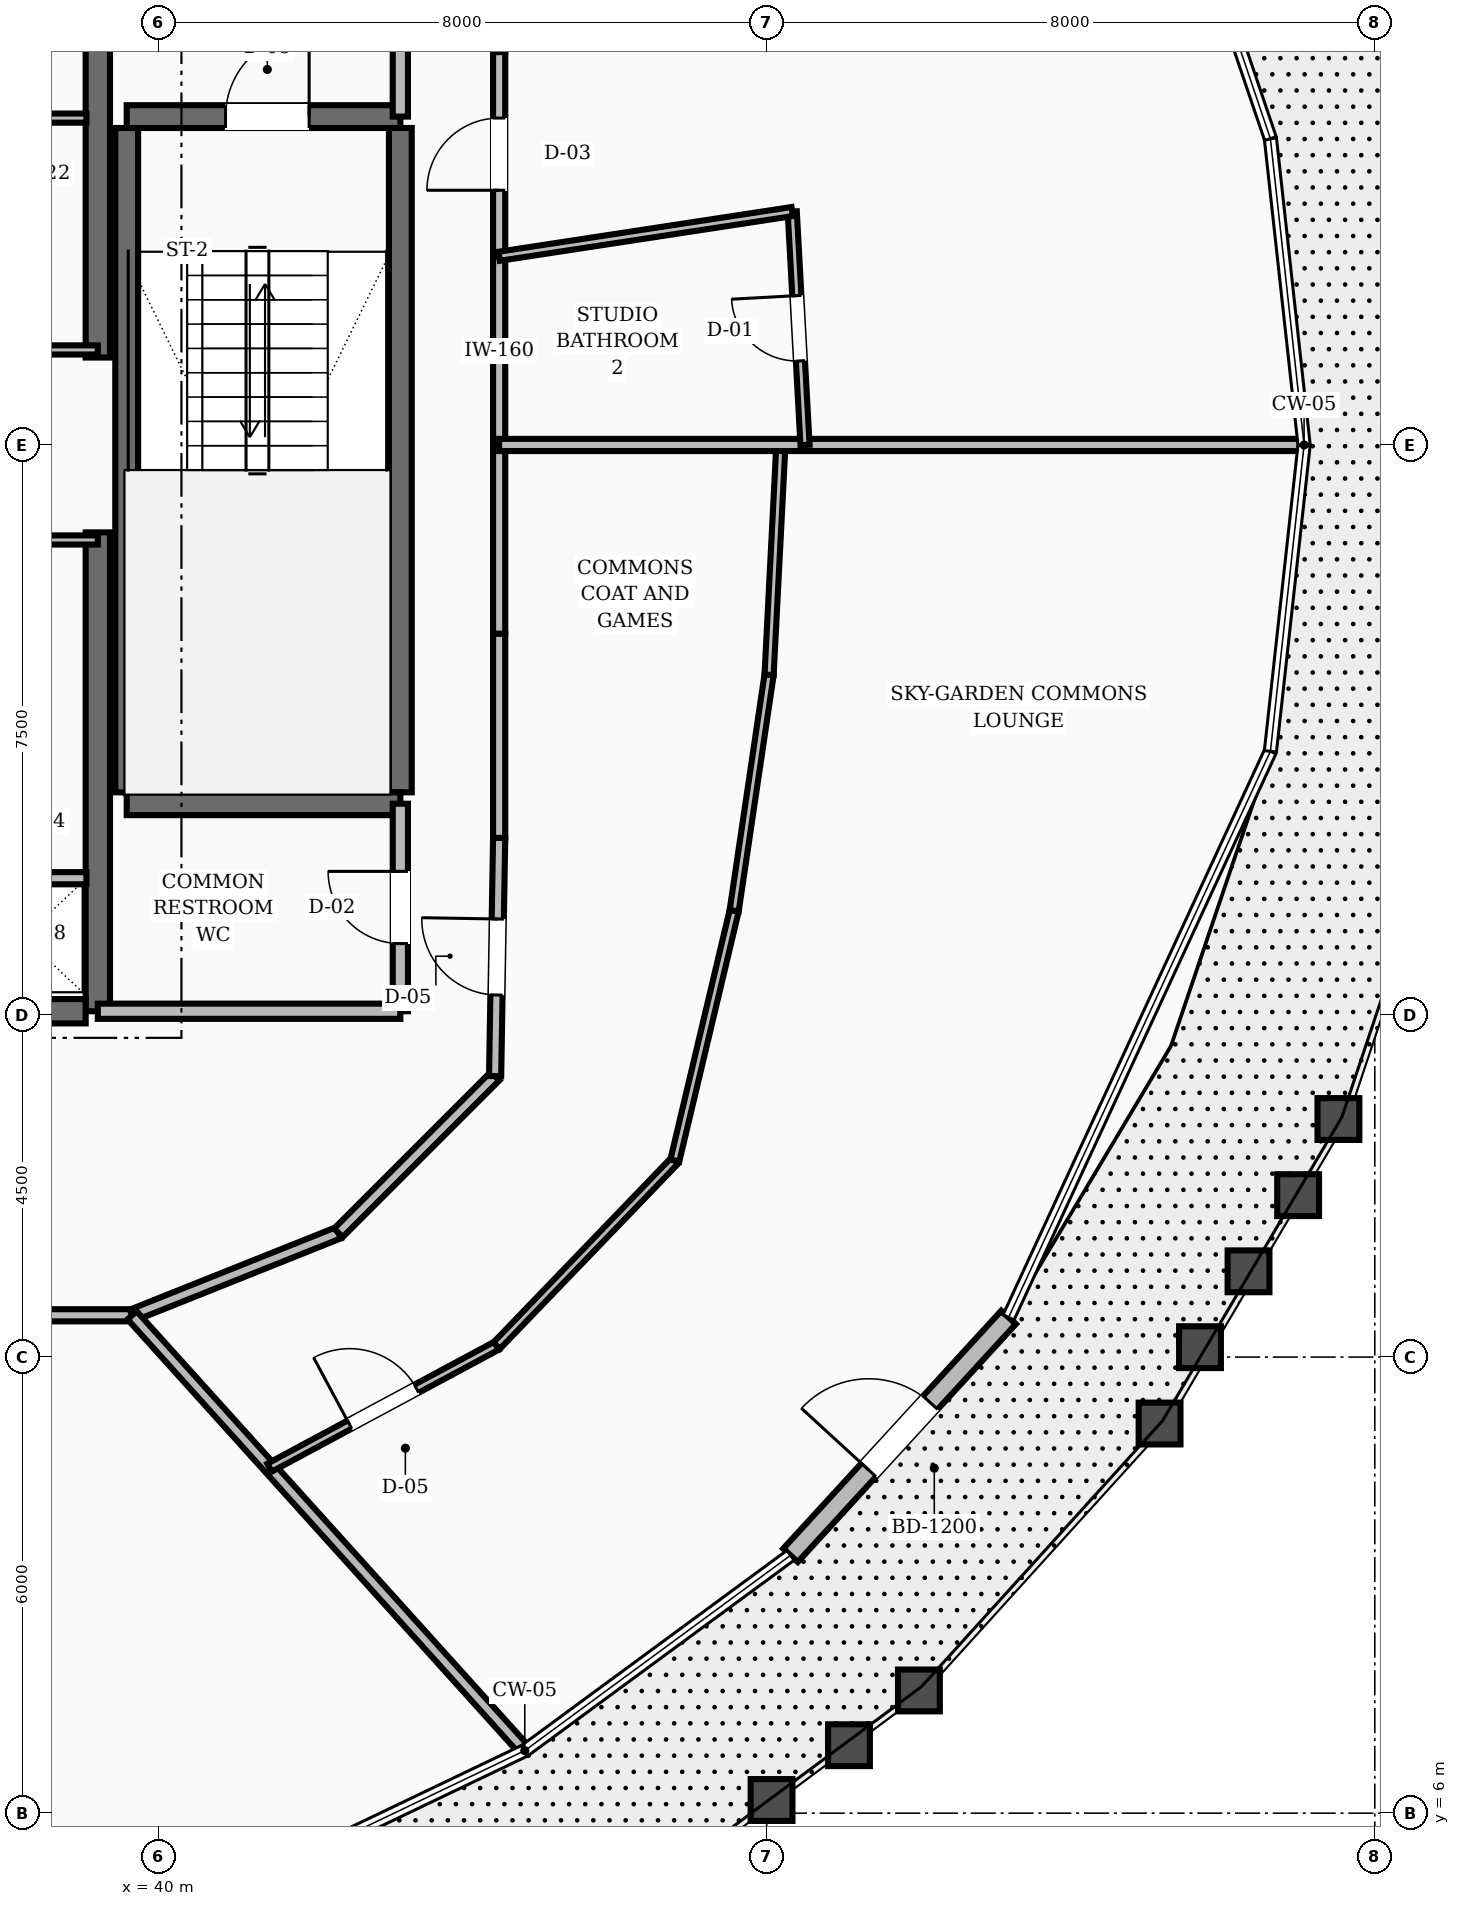
"""IFC4 building model, lengths in metres.
Left out: names, types, materials, properties, quantities, classifications, styles, units other than length and angle.
Written with IfcOpenShell. Run it as: python <this file> out.ifc"""

import sys

from ifc_helpers import new_model, si_unit, direction, frame, frame_2d, origin, place, context, subcontext, project, spatial, rectangle, extrude, element, fill, save


model = new_model("IFC4")
c1 = context("Model", 3, precision=1e-05, world=origin(), true_north=direction((0.0, 1.0)))
c2 = subcontext(c1, "Body", "Model", "MODEL_VIEW")
j1 = project(units=[si_unit("LENGTHUNIT", "METRE"), si_unit("PLANEANGLEUNIT", "RADIAN")], contexts=[c1])
p1 = place(None, origin())
s1 = spatial("IfcSite", under=j1, at=p1, CompositionType="ELEMENT")
p2 = place(p1, origin())
s2 = spatial("IfcBuilding", under=s1, at=p2, CompositionType="ELEMENT")
p3 = place(p2, frame((0.0, 0.0, 214.8)))
s3 = spatial("IfcBuildingStorey", under=s2, at=p3, CompositionType="ELEMENT", Elevation=214.8)
for number, where, z_axis, x_axis in (
    (1, (39.2, 16.55, 0.0), (0.0, 0.0, 1.0), (0.0, 1.0, 0.0)),
    (2, (39.2, 25.15, 0.0), (0.0, 0.0, 1.0), (0.0, 1.0, 0.0)),
):
    element("IfcWall", number, at=place(p3, frame(where, z_axis=z_axis, x_axis=x_axis)), inside=s3, PredefinedType="SHEAR", context=c2, shape_type="SweptSolid", body=[
        extrude(rectangle(XDim=6.3, YDim=0.32, at=frame_2d((3.15, 0.0))), origin(), (0.0, 0.0, 1.0), 3.6),
    ])
p4 = place(p3, frame((35.8, 16.55, 0.0), z_axis=(0.0, 0.0, 1.0), x_axis=(1.0, 0.0, 0.0)))
e3 = element("IfcWall", 3, at=p4, inside=s3, PredefinedType="SHEAR", context=c2, shape_type="SweptSolid", body=[
    extrude(rectangle(XDim=3.24, YDim=0.32, at=frame_2d((1.62, 0.0))), origin(), (0.0, 0.0, 1.0), 3.6),
])
p5 = place(p4, frame((0.3, 0.0, 0.0)))
e4 = element("IfcOpeningElement", 4, at=p5, cuts=e3, PredefinedType="OPENING", context=c2, shape_type="SweptSolid", body=[
    extrude(rectangle(XDim=1.1, YDim=2.1, at=frame_2d((0.55, 1.05))), frame((0.0, 0.17, 0.0), z_axis=(0.0, -1.0, 0.0), x_axis=(1.0, 0.0, 0.0)), (0.0, 0.0, 1.0), 0.34),
])
for number, where, z_axis, x_axis in (
    (5, (43.18, 19.43, 0.0), (0.0, 0.0, 1.0), (0.0, 1.0, 0.0)),
    (6, (39.58, 19.43, 0.0), (0.0, 0.0, 1.0), (0.0, 1.0, 0.0)),
):
    element("IfcWall", number, at=place(p3, frame(where, z_axis=z_axis, x_axis=x_axis)), inside=s3, PredefinedType="SHEAR", context=c2, shape_type="SweptSolid", body=[
        extrude(rectangle(XDim=8.74, YDim=0.3, at=frame_2d((4.37, 0.0))), origin(), (0.0, 0.0, 1.0), 3.6),
    ])
p6 = place(p3, frame((39.58, 19.28, 0.0), z_axis=(0.0, 0.0, 1.0), x_axis=(1.0, 0.0, 0.0)))
e7 = element("IfcWall", 7, at=p6, inside=s3, PredefinedType="SHEAR", context=c2, shape_type="SweptSolid", body=[
    extrude(rectangle(XDim=3.6, YDim=0.3, at=frame_2d((1.8, 0.0))), origin(), (0.0, 0.0, 1.0), 3.6),
])
p7 = place(p3, frame((39.58, 28.32, 0.0), z_axis=(0.0, 0.0, 1.0), x_axis=(1.0, 0.0, 0.0)))
e8 = element("IfcWall", 8, at=p7, inside=s3, PredefinedType="SHEAR", context=c2, shape_type="SweptSolid", body=[
    extrude(rectangle(XDim=3.6, YDim=0.3, at=frame_2d((1.8, 0.0))), origin(), (0.0, 0.0, 1.0), 3.6),
])
p8 = place(p7, frame((1.3, 0.0, 0.0)))
e9 = element("IfcOpeningElement", 9, at=p8, cuts=e8, PredefinedType="OPENING", context=c2, shape_type="SweptSolid", body=[
    extrude(rectangle(XDim=1.1, YDim=2.1, at=frame_2d((0.55, 1.05))), frame((0.0, 0.16, 0.0), z_axis=(0.0, -1.0, 0.0), x_axis=(1.0, 0.0, 0.0)), (0.0, 0.0, 1.0), 0.32),
])
p9 = place(p3, frame((48.313, 9.392, 0.0), z_axis=(0.0, 0.0, 1.0), x_axis=(0.675617876926, 0.737251981603, 0.0)))
e10 = element("IfcWall", 10, at=p9, inside=s3, PredefinedType="STANDARD", context=c2, shape_type="SweptSolid", body=[
    extrude(rectangle(XDim=4.246, YDim=0.26, at=frame_2d((2.123, 0.0))), origin(), (0.0, 0.0, 1.0), 2.88),
])
p10 = place(p9, frame((1.523, 0.0, 0.0)))
e11 = element("IfcOpeningElement", 11, at=p10, cuts=e10, PredefinedType="OPENING", context=c2, shape_type="SweptSolid", body=[
    extrude(rectangle(XDim=1.2, YDim=2.15, at=frame_2d((0.6, 1.075))), frame((0.0, 0.14, 0.0), z_axis=(0.0, -1.0, 0.0), x_axis=(1.0, 0.0, 0.0)), (0.0, 0.0, 1.0), 0.28),
])
p11 = place(p3, frame((43.18, 28.32, 0.0), z_axis=(0.0, 0.0, 1.0), x_axis=(0.0, 1.0, 0.0)))
e12 = element("IfcWall", 12, at=p11, inside=s3, PredefinedType="SOLIDWALL", context=c2, shape_type="SweptSolid", body=[
    extrude(rectangle(XDim=3.13, YDim=0.2, at=frame_2d((1.565, 0.0))), origin(), (0.0, 0.0, 1.0), 2.87),
])
p12 = place(p11, frame((1.015, 0.0, 0.0)))
e13 = element("IfcOpeningElement", 13, at=p12, cuts=e12, PredefinedType="OPENING", context=c2, shape_type="SweptSolid", body=[
    extrude(rectangle(XDim=1.1, YDim=2.1, at=frame_2d((0.55, 1.05))), frame((0.0, 0.11, 0.0), z_axis=(0.0, -1.0, 0.0), x_axis=(1.0, 0.0, 0.0)), (0.0, 0.0, 1.0), 0.22),
])
p13 = place(p3, frame((43.18, 16.55, 0.0), z_axis=(0.0, 0.0, 1.0), x_axis=(0.0, 1.0, 0.0)))
e14 = element("IfcWall", 14, at=p13, inside=s3, PredefinedType="SOLIDWALL", context=c2, shape_type="SweptSolid", body=[
    extrude(rectangle(XDim=2.73, YDim=0.2, at=frame_2d((1.365, 0.0))), origin(), (0.0, 0.0, 1.0), 2.87),
])
p14 = place(p13, frame((0.89, 0.0, 0.0)))
e15 = element("IfcOpeningElement", 15, at=p14, cuts=e14, PredefinedType="OPENING", context=c2, shape_type="SweptSolid", body=[
    extrude(rectangle(XDim=0.95, YDim=2.1, at=frame_2d((0.475, 1.05))), frame((0.0, 0.11, 0.0), z_axis=(0.0, -1.0, 0.0), x_axis=(1.0, 0.0, 0.0)), (0.0, 0.0, 1.0), 0.22),
])
p15 = place(p3, frame((39.2, 16.55, 0.0), z_axis=(0.0, 0.0, 1.0), x_axis=(1.0, 0.0, 0.0)))
e16 = element("IfcWall", 16, at=p15, inside=s3, PredefinedType="SOLIDWALL", context=c2, shape_type="SweptSolid", body=[
    extrude(rectangle(XDim=3.98, YDim=0.2, at=frame_2d((1.99, 0.0))), origin(), (0.0, 0.0, 1.0), 2.87),
])
p16 = place(p3, frame((37.4, 18.3, 0.0), z_axis=(0.0, 0.0, 1.0), x_axis=(1.0, 0.0, 0.0)))
e17 = element("IfcWall", 17, at=p16, inside=s3, PredefinedType="SOLIDWALL", context=c2, shape_type="SweptSolid", body=[
    extrude(rectangle(XDim=1.65, YDim=0.16, at=frame_2d((0.825, 0.0))), origin(), (0.0, 0.0, 1.0), 2.87),
])
for number, where, z_axis, x_axis in (
    (18, (37.4, 25.25, 0.0), (0.0, 0.0, 1.0), (1.0, 0.0, 0.0)),
    (19, (37.4, 22.75, 0.0), (0.0, 0.0, 1.0), (1.0, 0.0, 0.0)),
):
    element("IfcWall", number, at=place(p3, frame(where, z_axis=z_axis, x_axis=x_axis)), inside=s3, PredefinedType="PARTITIONING", context=c2, shape_type="SweptSolid", body=[
        extrude(rectangle(XDim=1.8, YDim=0.12, at=frame_2d((0.9, 0.0))), origin(), (0.0, 0.0, 1.0), 2.87),
    ])
p17 = place(p3, frame((37.4, 28.3, 0.0), z_axis=(0.0, 0.0, 1.0), x_axis=(1.0, 0.0, 0.0)))
e20 = element("IfcWall", 20, at=p17, inside=s3, PredefinedType="PARTITIONING", context=c2, shape_type="SweptSolid", body=[
    extrude(rectangle(XDim=1.65, YDim=0.12, at=frame_2d((0.825, 0.0))), origin(), (0.0, 0.0, 1.0), 2.87),
])
p18 = place(p3, frame((44.48, 24.0, 0.0), z_axis=(0.0, 0.0, 1.0), x_axis=(0.0, 1.0, 0.0)))
e21 = element("IfcWall", 21, at=p18, inside=s3, PredefinedType="SOLIDWALL", context=c2, shape_type="SweptSolid", body=[
    extrude(rectangle(XDim=2.482, YDim=0.16, at=frame_2d((1.241, 0.0))), origin(), (0.0, 0.0, 1.0), 2.87),
])
p19 = place(p3, frame((44.48, 26.482, 0.0), z_axis=(0.0, 0.0, 1.0), x_axis=(0.0, 1.0, 0.0)))
e22 = element("IfcWall", 22, at=p19, inside=s3, PredefinedType="SOLIDWALL", context=c2, shape_type="SweptSolid", body=[
    extrude(rectangle(XDim=2.687, YDim=0.16, at=frame_2d((1.344, 0.0))), origin(), (0.0, 0.0, 1.0), 2.87),
])
p20 = place(p19, frame((0.868, 0.0, 0.0)))
e23 = element("IfcOpeningElement", 23, at=p20, cuts=e22, PredefinedType="OPENING", context=c2, shape_type="SweptSolid", body=[
    extrude(rectangle(XDim=0.95, YDim=2.1, at=frame_2d((0.475, 1.05))), frame((0.0, 0.09, 0.0), z_axis=(0.0, -1.0, 0.0), x_axis=(1.0, 0.0, 0.0)), (0.0, 0.0, 1.0), 0.18),
])
p21 = place(p3, frame((44.48, 29.169, 0.0), z_axis=(0.0, 0.0, 1.0), x_axis=(-0.016981035134, 0.999855811828, 0.0)))
e24 = element("IfcWall", 24, at=p21, inside=s3, PredefinedType="SOLIDWALL", context=c2, shape_type="SweptSolid", body=[
    extrude(rectangle(XDim=3.134, YDim=0.16, at=frame_2d((1.567, 0.0))), origin(), (0.0, 0.0, 1.0), 2.87),
])
p22 = place(p3, frame((36.743, 12.55, 0.0), z_axis=(0.0, 0.0, 1.0), x_axis=(1.0, 0.0, 0.0)))
e25 = element("IfcWall", 25, at=p22, inside=s3, PredefinedType="SOLIDWALL", context=c2, shape_type="SweptSolid", body=[
    extrude(rectangle(XDim=2.908, YDim=0.16, at=frame_2d((1.454, 0.0))), origin(), (0.0, 0.0, 1.0), 2.87),
])
p23 = place(p3, frame((39.651, 12.55, 0.0), z_axis=(0.0, 0.0, 1.0), x_axis=(0.92856882165, 0.371160266542, 0.0)))
e26 = element("IfcWall", 26, at=p23, inside=s3, PredefinedType="SOLIDWALL", context=c2, shape_type="SweptSolid", body=[
    extrude(rectangle(XDim=2.923, YDim=0.16, at=frame_2d((1.461, 0.0))), origin(), (0.0, 0.0, 1.0), 2.87),
])
p24 = place(p3, frame((42.365, 13.635, 0.0), z_axis=(0.0, 0.0, 1.0), x_axis=(0.707106781187, 0.707106781187, 0.0)))
e27 = element("IfcWall", 27, at=p24, inside=s3, PredefinedType="SOLIDWALL", context=c2, shape_type="SweptSolid", body=[
    extrude(rectangle(XDim=2.916, YDim=0.16, at=frame_2d((1.458, 0.0))), origin(), (0.0, 0.0, 1.0), 2.87),
])
p25 = place(p3, frame((44.427, 15.697, 0.0), z_axis=(0.0, 0.0, 1.0), x_axis=(0.016981035134, 0.999855811828, 0.0)))
e28 = element("IfcWall", 28, at=p25, inside=s3, PredefinedType="SOLIDWALL", context=c2, shape_type="SweptSolid", body=[
    extrude(rectangle(XDim=3.134, YDim=0.16, at=frame_2d((1.567, 0.0))), origin(), (0.0, 0.0, 1.0), 2.87),
])
p26 = place(p25, frame((1.067, 0.0, 0.0)))
e29 = element("IfcOpeningElement", 29, at=p26, cuts=e28, PredefinedType="OPENING", context=c2, shape_type="SweptSolid", body=[
    extrude(rectangle(XDim=1.0, YDim=2.1, at=frame_2d((0.5, 1.05))), frame((0.0, 0.09, 0.0), z_axis=(0.0, -1.0, 0.0), x_axis=(1.0, 0.0, 0.0)), (0.0, 0.0, 1.0), 0.18),
])
p27 = place(p3, frame((44.48, 18.831, 0.0), z_axis=(0.0, 0.0, 1.0), x_axis=(0.0, 1.0, 0.0)))
e30 = element("IfcWall", 30, at=p27, inside=s3, PredefinedType="SOLIDWALL", context=c2, shape_type="SweptSolid", body=[
    extrude(rectangle(XDim=2.687, YDim=0.16, at=frame_2d((1.344, 0.0))), origin(), (0.0, 0.0, 1.0), 2.87),
])
p28 = place(p3, frame((44.48, 21.518, 0.0), z_axis=(0.0, 0.0, 1.0), x_axis=(0.0, 1.0, 0.0)))
e31 = element("IfcWall", 31, at=p28, inside=s3, PredefinedType="SOLIDWALL", context=c2, shape_type="SweptSolid", body=[
    extrude(rectangle(XDim=2.482, YDim=0.16, at=frame_2d((1.241, 0.0))), origin(), (0.0, 0.0, 1.0), 2.87),
])
p29 = place(p3, frame((39.651, 12.55, 0.0), z_axis=(0.0, 0.0, 1.0), x_axis=(0.669803904272, -0.742538032576, 0.0)))
e32 = element("IfcWall", 32, at=p29, inside=s3, PredefinedType="SOLIDWALL", context=c2, shape_type="SweptSolid", body=[
    extrude(rectangle(XDim=7.663, YDim=0.16, at=frame_2d((3.832, 0.0))), origin(), (0.0, 0.0, 1.0), 2.87),
])
p30 = place(p3, frame((41.459, 10.545, 0.0), z_axis=(0.0, 0.0, 1.0), x_axis=(0.881018320822, 0.473082147597, 0.0)))
e33 = element("IfcWall", 33, at=p30, inside=s3, PredefinedType="PARTITIONING", context=c2, shape_type="SweptSolid", body=[
    extrude(rectangle(XDim=3.392, YDim=0.12, at=frame_2d((1.696, 0.0))), origin(), (0.0, 0.0, 1.0), 2.87),
])
p31 = place(p30, frame((1.196, 0.0, 0.0)))
e34 = element("IfcOpeningElement", 34, at=p31, cuts=e33, PredefinedType="OPENING", context=c2, shape_type="SweptSolid", body=[
    extrude(rectangle(XDim=1.0, YDim=2.1, at=frame_2d((0.5, 1.05))), frame((0.0, 0.07, 0.0), z_axis=(0.0, -1.0, 0.0), x_axis=(1.0, 0.0, 0.0)), (0.0, 0.0, 1.0), 0.14),
])
p32 = place(p3, frame((44.447, 12.15, 0.0), z_axis=(0.0, 0.0, 1.0), x_axis=(0.693436261911, 0.720517973868, 0.0)))
e35 = element("IfcWall", 35, at=p32, inside=s3, PredefinedType="PARTITIONING", context=c2, shape_type="SweptSolid", body=[
    extrude(rectangle(XDim=3.381, YDim=0.12, at=frame_2d((1.69, 0.0))), origin(), (0.0, 0.0, 1.0), 2.87),
])
p33 = place(p3, frame((46.791, 14.586, 0.0), z_axis=(0.0, 0.0, 1.0), x_axis=(0.231161352682, 0.972915427479, 0.0)))
e36 = element("IfcWall", 36, at=p33, inside=s3, PredefinedType="PARTITIONING", context=c2, shape_type="SweptSolid", body=[
    extrude(rectangle(XDim=3.379, YDim=0.12, at=frame_2d((1.689, 0.0))), origin(), (0.0, 0.0, 1.0), 2.87),
])
p34 = place(p3, frame((47.572, 17.873, 0.0), z_axis=(0.0, 0.0, 1.0), x_axis=(0.146399162182, 0.989225598796, 0.0)))
e37 = element("IfcWall", 37, at=p34, inside=s3, PredefinedType="PARTITIONING", context=c2, shape_type="SweptSolid", body=[
    extrude(rectangle(XDim=3.137, YDim=0.12, at=frame_2d((1.568, 0.0))), origin(), (0.0, 0.0, 1.0), 2.87),
])
p35 = place(p3, frame((48.031, 20.976, 0.0), z_axis=(0.0, 0.0, 1.0), x_axis=(0.051276607355, 0.998684489485, 0.0)))
e38 = element("IfcWall", 38, at=p35, inside=s3, PredefinedType="PARTITIONING", context=c2, shape_type="SweptSolid", body=[
    extrude(rectangle(XDim=3.028, YDim=0.12, at=frame_2d((1.514, 0.0))), origin(), (0.0, 0.0, 1.0), 2.87),
])
p36 = place(p3, frame((44.48, 24.0, 0.0), z_axis=(0.0, 0.0, 1.0), x_axis=(1.0, 0.0, 0.0)))
e39 = element("IfcWall", 39, at=p36, inside=s3, PredefinedType="SOLIDWALL", context=c2, shape_type="SweptSolid", body=[
    extrude(rectangle(XDim=10.54, YDim=0.16, at=frame_2d((5.27, 0.0))), origin(), (0.0, 0.0, 1.0), 2.87),
])
p37 = place(p3, frame((48.504, 24.0, 0.0), z_axis=(0.0, 0.0, 1.0), x_axis=(-0.054779672564, 0.998498466435, 0.0)))
e40 = element("IfcWall", 40, at=p37, inside=s3, PredefinedType="PARTITIONING", context=c2, shape_type="SweptSolid", body=[
    extrude(rectangle(XDim=3.075, YDim=0.12, at=frame_2d((1.538, 0.0))), origin(), (0.0, 0.0, 1.0), 2.87),
])
p38 = place(p37, frame((1.108, 0.0, 0.0)))
e41 = element("IfcOpeningElement", 41, at=p38, cuts=e40, PredefinedType="OPENING", context=c2, shape_type="SweptSolid", body=[
    extrude(rectangle(XDim=0.86, YDim=2.1, at=frame_2d((0.43, 1.05))), frame((0.0, 0.07, 0.0), z_axis=(0.0, -1.0, 0.0), x_axis=(1.0, 0.0, 0.0)), (0.0, 0.0, 1.0), 0.14),
])
p39 = place(p3, frame((44.48, 26.482, 0.0), z_axis=(0.0, 0.0, 1.0), x_axis=(0.988565547882, 0.150791768812, 0.0)))
e42 = element("IfcWall", 42, at=p39, inside=s3, PredefinedType="PARTITIONING", context=c2, shape_type="SweptSolid", body=[
    extrude(rectangle(XDim=3.9, YDim=0.12, at=frame_2d((1.95, 0.0))), origin(), (0.0, 0.0, 1.0), 2.87),
])
p40 = place(p10, origin())
e43 = element("IfcDoor", 43, at=p40, inside=s3, OperationType="SINGLE_SWING_LEFT", PredefinedType="DOOR", context=c2, shape_type="SweptSolid", body=[
    extrude(rectangle(XDim=1.2, YDim=2.15, at=frame_2d((0.6, 1.075))), frame((0.0, 0.025, 0.0), z_axis=(0.0, -1.0, 0.0), x_axis=(1.0, 0.0, 0.0)), (0.0, 0.0, 1.0), 0.05),
])
fill(e11, e43)
p41 = place(p8, origin())
e44 = element("IfcDoor", 44, at=p41, inside=s3, OperationType="SINGLE_SWING_RIGHT", PredefinedType="DOOR", context=c2, shape_type="SweptSolid", body=[
    extrude(rectangle(XDim=1.1, YDim=2.1, at=frame_2d((0.55, 1.05))), frame((0.0, 0.025, 0.0), z_axis=(0.0, -1.0, 0.0), x_axis=(1.0, 0.0, 0.0)), (0.0, 0.0, 1.0), 0.05),
])
fill(e9, e44)
p42 = place(p14, origin())
e45 = element("IfcDoor", 45, at=p42, inside=s3, OperationType="SINGLE_SWING_RIGHT", PredefinedType="DOOR", context=c2, shape_type="SweptSolid", body=[
    extrude(rectangle(XDim=0.95, YDim=2.1, at=frame_2d((0.475, 1.05))), frame((0.0, 0.025, 0.0), z_axis=(0.0, -1.0, 0.0), x_axis=(1.0, 0.0, 0.0)), (0.0, 0.0, 1.0), 0.05),
])
fill(e15, e45)
p43 = place(p26, origin())
e46 = element("IfcDoor", 46, at=p43, inside=s3, OperationType="SINGLE_SWING_RIGHT", PredefinedType="DOOR", context=c2, shape_type="SweptSolid", body=[
    extrude(rectangle(XDim=1.0, YDim=2.1, at=frame_2d((0.5, 1.05))), frame((0.0, 0.025, 0.0), z_axis=(0.0, -1.0, 0.0), x_axis=(1.0, 0.0, 0.0)), (0.0, 0.0, 1.0), 0.05),
])
fill(e29, e46)
p44 = place(p31, origin())
e47 = element("IfcDoor", 47, at=p44, inside=s3, OperationType="SINGLE_SWING_LEFT", PredefinedType="DOOR", context=c2, shape_type="SweptSolid", body=[
    extrude(rectangle(XDim=1.0, YDim=2.1, at=frame_2d((0.5, 1.05))), frame((0.0, 0.025, 0.0), z_axis=(0.0, -1.0, 0.0), x_axis=(1.0, 0.0, 0.0)), (0.0, 0.0, 1.0), 0.05),
])
fill(e34, e47)
p45 = place(p38, origin())
e48 = element("IfcDoor", 48, at=p45, inside=s3, OperationType="SINGLE_SWING_RIGHT", PredefinedType="DOOR", context=c2, shape_type="SweptSolid", body=[
    extrude(rectangle(XDim=0.86, YDim=2.1, at=frame_2d((0.43, 1.05))), frame((0.0, 0.025, 0.0), z_axis=(0.0, -1.0, 0.0), x_axis=(1.0, 0.0, 0.0)), (0.0, 0.0, 1.0), 0.05),
])
fill(e41, e48)
p46 = place(p20, origin())
e49 = element("IfcDoor", 49, at=p46, inside=s3, OperationType="SINGLE_SWING_LEFT", PredefinedType="DOOR", context=c2, shape_type="SweptSolid", body=[
    extrude(rectangle(XDim=0.95, YDim=2.1, at=frame_2d((0.475, 1.05))), frame((0.0, 0.025, 0.0), z_axis=(0.0, -1.0, 0.0), x_axis=(1.0, 0.0, 0.0)), (0.0, 0.0, 1.0), 0.05),
])
fill(e23, e49)
save(model, sys.argv[1])
